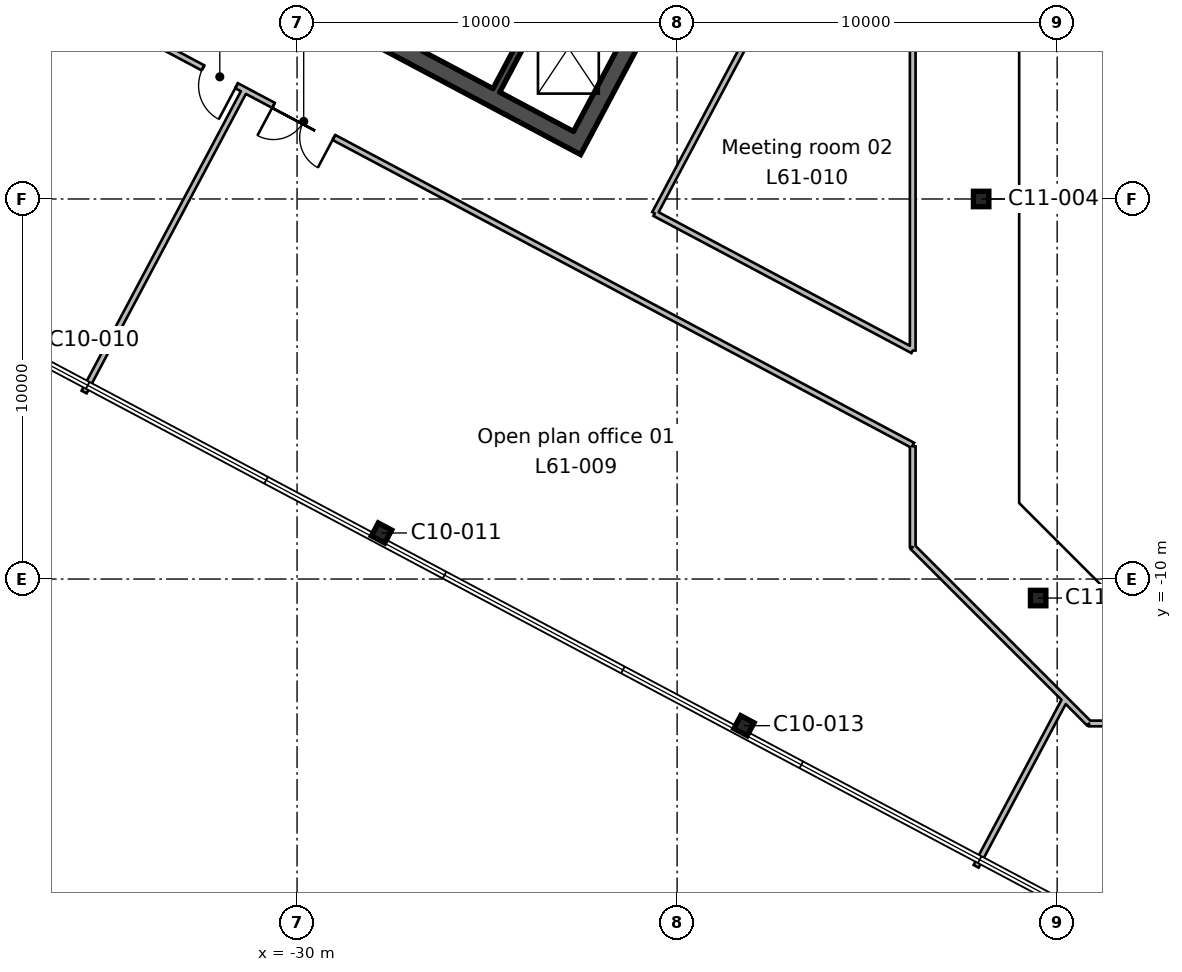
"""IFC4 building model, lengths in metres.
Left out: names, types, materials, properties, quantities, classifications, styles, units other than length and angle.
Written with IfcOpenShell. Run it as: python <this file> out.ifc"""

import sys

from ifc_helpers import new_model, si_unit, direction, frame, frame_2d, origin, origin_2d, place, context, subcontext, project, spatial, rectangle, hollow_rectangle, i_section, extrude, element, fill, save


model = new_model("IFC4")
c1 = context("Model", 3, precision=1e-05, world=origin(), true_north=direction((0.0, 1.0)))
c2 = subcontext(c1, "Body", "Model", "MODEL_VIEW")
j1 = project(units=[si_unit("LENGTHUNIT", "METRE"), si_unit("PLANEANGLEUNIT", "RADIAN")], contexts=[c1])
p1 = place(None, origin())
s1 = spatial("IfcSite", under=j1, at=p1, CompositionType="ELEMENT")
p2 = place(p1, origin())
s2 = spatial("IfcBuilding", under=s1, at=p2, CompositionType="ELEMENT")
p3 = place(p2, frame((0.0, 0.0, 273.6)))
s3 = spatial("IfcBuildingStorey", under=s2, at=p3, CompositionType="ELEMENT", Elevation=273.6)
p4 = place(p3, frame((-18.241, -13.858, 0.0), z_axis=(0.0, 0.0, 1.0), x_axis=(0.882947592859, -0.469471562786, 0.0)))
e1 = element("IfcColumn", 1, at=p4, inside=s3, PredefinedType="COLUMN", context=c2, shape_type="SweptSolid", body=[
    extrude(i_section(OverallWidth=0.399, OverallDepth=0.386, WebThickness=0.021, FlangeThickness=0.033, FilletRadius=0.015, at=origin_2d()), origin(), (0.0, 0.0, 1.0), 3.9),
])
p5 = place(p3, frame((-10.5, -10.5, 0.0), z_axis=(0.0, 0.0, 1.0), x_axis=(1.0, 0.0, 0.0)))
e2 = element("IfcColumn", 2, at=p5, inside=s3, PredefinedType="COLUMN", context=c2, shape_type="SweptSolid", body=[
    extrude(hollow_rectangle(XDim=0.406, YDim=0.406, WallThickness=0.009, InnerFilletRadius=0.004, OuterFilletRadius=0.013, at=origin_2d()), origin(), (0.0, 0.0, 1.0), 3.9),
])
p6 = place(p3, frame((-27.777, -8.788, 0.0), z_axis=(0.0, 0.0, 1.0), x_axis=(0.882947592859, -0.469471562786, 0.0)))
e3 = element("IfcColumn", 3, at=p6, inside=s3, PredefinedType="COLUMN", context=c2, shape_type="SweptSolid", body=[
    extrude(i_section(OverallWidth=0.399, OverallDepth=0.386, WebThickness=0.021, FlangeThickness=0.033, FilletRadius=0.015, at=origin_2d()), origin(), (0.0, 0.0, 1.0), 3.9),
])
p7 = place(p3, frame((-12.0, 0.0, 0.0), z_axis=(0.0, 0.0, 1.0), x_axis=(1.0, 0.0, 0.0)))
e4 = element("IfcColumn", 4, at=p7, inside=s3, PredefinedType="COLUMN", context=c2, shape_type="SweptSolid", body=[
    extrude(hollow_rectangle(XDim=0.406, YDim=0.406, WallThickness=0.009, InnerFilletRadius=0.004, OuterFilletRadius=0.013, at=origin_2d()), origin(), (0.0, 0.0, 1.0), 3.9),
])
p8 = place(p3, frame((-13.771, 18.138, 0.0), z_axis=(0.0, 0.0, 1.0), x_axis=(-0.469467968382, -0.882949504028, 0.0)))
e5 = element("IfcWall", 5, at=p8, inside=s3, PredefinedType="SHEAR", context=c2, shape_type="SweptSolid", body=[
    extrude(rectangle(XDim=19.1, YDim=0.45, at=frame_2d((9.55, 0.0))), origin(), (0.0, 0.0, 1.0), 3.9),
])
p9 = place(p8, frame((6.55, 0.0, 0.0)))
e6 = element("IfcOpeningElement", 6, at=p9, cuts=e5, PredefinedType="OPENING", context=c2, shape_type="SweptSolid", body=[
    extrude(rectangle(XDim=2.4, YDim=2.4, at=frame_2d((1.2, 1.2))), frame((0.0, 0.235, 0.0), z_axis=(0.0, -1.0, 0.0), x_axis=(1.0, 0.0, 0.0)), (0.0, 0.0, 1.0), 0.47),
])
p10 = place(p3, frame((-22.832, 1.578, 0.0), z_axis=(0.0, 0.0, 1.0), x_axis=(-0.88294509198, 0.469476266226, 0.0)))
e7 = element("IfcWall", 7, at=p10, inside=s3, PredefinedType="SHEAR", context=c2, shape_type="SweptSolid", body=[
    extrude(rectangle(XDim=20.2, YDim=0.45, at=frame_2d((10.1, 0.0))), origin(), (0.0, 0.0, 1.0), 3.9),
])
p11 = place(p3, frame((-23.043, 6.08, 0.0), z_axis=(0.0, 0.0, 1.0), x_axis=(-0.469494272526, -0.882935517501, 0.0)))
e8 = element("IfcWall", 8, at=p11, inside=s3, PredefinedType="SHEAR", context=c2, shape_type="SweptSolid", body=[
    extrude(rectangle(XDim=3.65, YDim=0.2, at=frame_2d((1.825, 0.0))), origin(), (0.0, 0.0, 1.0), 3.9),
])
p12 = place(p3, frame((-31.377, 2.866, 0.0), z_axis=(0.0, 0.0, 1.0), x_axis=(-0.469565734835, -0.88289751425, 0.0)))
e9 = element("IfcWall", 9, at=p12, inside=s3, PredefinedType="PARTITIONING", context=c2, shape_type="SweptSolid", body=[
    extrude(rectangle(XDim=9.0, YDim=0.15, at=frame_2d((4.5, 0.0))), origin(), (0.0, 0.0, 1.0), 3.54),
])
p13 = place(p3, frame((-13.8, -6.48, 0.0), z_axis=(0.0, 0.0, 1.0), x_axis=(-0.882943991273, 0.469478336322, 0.0)))
e10 = element("IfcWall", 10, at=p13, inside=s3, PredefinedType="PARTITIONING", context=c2, shape_type="SweptSolid", body=[
    extrude(rectangle(XDim=36.33, YDim=0.15, at=frame_2d((18.165, 0.0))), origin(), (0.0, 0.0, 1.0), 3.54),
])
p14 = place(p13, frame((20.15, 0.0, 0.0)))
e11 = element("IfcOpeningElement", 11, at=p14, cuts=e10, PredefinedType="OPENING", context=c2, shape_type="SweptSolid", body=[
    extrude(rectangle(XDim=1.0, YDim=2.1, at=frame_2d((0.5, 1.05))), frame((0.0, 0.085, 0.0), z_axis=(0.0, -1.0, 0.0), x_axis=(1.0, 0.0, 0.0)), (0.0, 0.0, 1.0), 0.17),
])
p15 = place(p13, frame((17.25, 0.0, 0.0)))
e12 = element("IfcOpeningElement", 12, at=p15, cuts=e10, PredefinedType="OPENING", context=c2, shape_type="SweptSolid", body=[
    extrude(rectangle(XDim=1.8, YDim=2.1, at=frame_2d((0.9, 1.05))), frame((0.0, 0.085, 0.0), z_axis=(0.0, -1.0, 0.0), x_axis=(1.0, 0.0, 0.0)), (0.0, 0.0, 1.0), 0.17),
])
p16 = place(p3, frame((-9.899, -13.06, 0.0), z_axis=(0.0, 0.0, 1.0), x_axis=(-0.707195291234, 0.707018260058, 0.0)))
e13 = element("IfcWall", 13, at=p16, inside=s3, PredefinedType="PARTITIONING", context=c2, shape_type="SweptSolid", body=[
    extrude(rectangle(XDim=5.516, YDim=0.15, at=frame_2d((2.758, 0.0))), origin(), (0.0, 0.0, 1.0), 3.54),
])
p17 = place(p3, frame((-13.8, -9.16, 0.0), z_axis=(0.0, 0.0, 1.0), x_axis=(0.0, 1.0, 0.0)))
e14 = element("IfcWall", 14, at=p17, inside=s3, PredefinedType="PARTITIONING", context=c2, shape_type="SweptSolid", body=[
    extrude(rectangle(XDim=2.654, YDim=0.15, at=frame_2d((1.327, 0.0))), origin(), (0.0, 0.0, 1.0), 3.54),
])
p18 = place(p3, frame((-9.794, -13.165, 0.0), z_axis=(0.0, 0.0, 1.0), x_axis=(-0.469669090987, -0.882842536906, 0.0)))
e15 = element("IfcWall", 15, at=p18, inside=s3, PredefinedType="PARTITIONING", context=c2, shape_type="SweptSolid", body=[
    extrude(rectangle(XDim=4.978, YDim=0.15, at=frame_2d((2.489, 0.0))), origin(), (0.0, 0.0, 1.0), 3.54),
])
p19 = place(p3, frame((-9.16, -13.8, 0.0), z_axis=(0.0, 0.0, 1.0), x_axis=(-0.706639735909, 0.707573518183, 0.0)))
e16 = element("IfcWall", 16, at=p19, inside=s3, PredefinedType="PARTITIONING", context=c2, shape_type="SweptSolid", body=[
    extrude(rectangle(XDim=1.046, YDim=0.15, at=frame_2d((0.523, 0.0))), origin(), (0.0, 0.0, 1.0), 3.54),
])
p20 = place(p3, frame((-2.649, -13.8, 0.0), z_axis=(0.0, 0.0, 1.0), x_axis=(-1.0, 0.0, 0.0)))
e17 = element("IfcWall", 17, at=p20, inside=s3, PredefinedType="PARTITIONING", context=c2, shape_type="SweptSolid", body=[
    extrude(rectangle(XDim=6.511, YDim=0.15, at=frame_2d((3.255, 0.0))), origin(), (0.0, 0.0, 1.0), 3.54),
])
p21 = place(p3, frame((-20.588, -0.379, 0.0), z_axis=(0.0, 0.0, 1.0), x_axis=(0.469489882812, 0.882937851685, 0.0)))
e18 = element("IfcWall", 18, at=p21, inside=s3, PredefinedType="PARTITIONING", context=c2, shape_type="SweptSolid", body=[
    extrude(rectangle(XDim=20.0, YDim=0.15, at=frame_2d((10.0, 0.0))), origin(), (0.0, 0.0, 1.0), 3.54),
])
p22 = place(p21, frame((9.55, 0.0, 0.0)))
e19 = element("IfcOpeningElement", 19, at=p22, cuts=e18, PredefinedType="OPENING", context=c2, shape_type="SweptSolid", body=[
    extrude(rectangle(XDim=1.0, YDim=2.1, at=frame_2d((0.5, 1.05))), frame((0.0, 0.085, 0.0), z_axis=(0.0, -1.0, 0.0), x_axis=(1.0, 0.0, 0.0)), (0.0, 0.0, 1.0), 0.17),
])
p23 = place(p3, frame((-13.8, 9.16, 0.0), z_axis=(0.0, 0.0, 1.0), x_axis=(0.0, -1.0, 0.0)))
e20 = element("IfcWall", 20, at=p23, inside=s3, PredefinedType="PARTITIONING", context=c2, shape_type="SweptSolid", body=[
    extrude(rectangle(XDim=13.148, YDim=0.15, at=frame_2d((6.574, 0.0))), origin(), (0.0, 0.0, 1.0), 3.54),
])
p24 = place(p3, frame((-13.8, -3.988, 0.0), z_axis=(0.0, 0.0, 1.0), x_axis=(-0.882949137368, 0.469468657976, 0.0)))
e21 = element("IfcWall", 21, at=p24, inside=s3, PredefinedType="PARTITIONING", context=c2, shape_type="SweptSolid", body=[
    extrude(rectangle(XDim=7.688, YDim=0.15, at=frame_2d((3.844, 0.0))), origin(), (0.0, 0.0, 1.0), 3.54),
])
p25 = place(p14, origin())
e22 = element("IfcDoor", 22, at=p25, inside=s3, OperationType="SINGLE_SWING_LEFT", PredefinedType="DOOR", context=c2, shape_type="SweptSolid", body=[
    extrude(rectangle(XDim=1.0, YDim=2.1, at=frame_2d((0.5, 1.05))), frame((0.0, 0.025, 0.0), z_axis=(0.0, -1.0, 0.0), x_axis=(1.0, 0.0, 0.0)), (0.0, 0.0, 1.0), 0.05),
])
fill(e11, e22)
p26 = place(p15, origin())
e23 = element("IfcDoor", 23, at=p26, inside=s3, OperationType="DOUBLE_DOOR_SINGLE_SWING", PredefinedType="DOOR", context=c2, shape_type="SweptSolid", body=[
    extrude(rectangle(XDim=1.8, YDim=2.1, at=frame_2d((0.9, 1.05))), frame((0.0, 0.025, 0.0), z_axis=(0.0, -1.0, 0.0), x_axis=(1.0, 0.0, 0.0)), (0.0, 0.0, 1.0), 0.05),
])
fill(e12, e23)
save(model, sys.argv[1])
